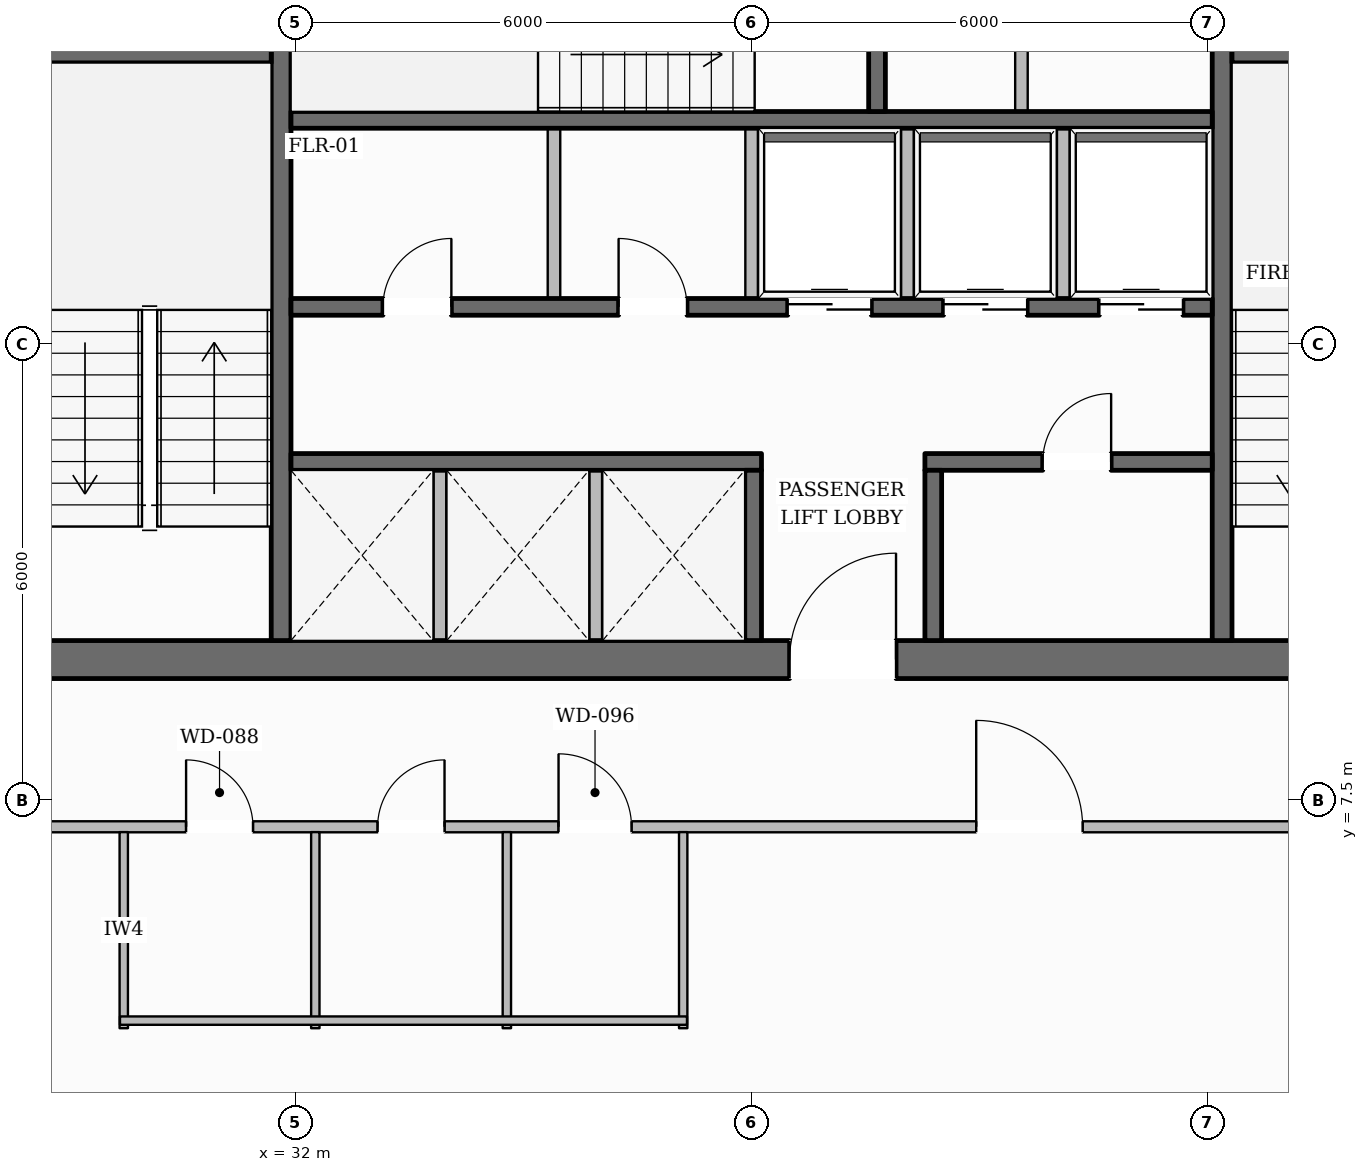
"""IFC4 building model, lengths in metres.
Left out: names, types, materials, properties, quantities, classifications, styles, units other than length and angle.
Written with IfcOpenShell. Run it as: python <this file> out.ifc"""

import sys

from ifc_helpers import new_model, si_unit, direction, frame, frame_2d, origin, place, context, subcontext, project, spatial, rectangle, extrude, element, fill, save


model = new_model("IFC4")
c1 = context("Model", 3, precision=1e-05, world=origin(), true_north=direction((0.0, 1.0)))
c2 = subcontext(c1, "Body", "Model", "MODEL_VIEW")
j1 = project(units=[si_unit("LENGTHUNIT", "METRE"), si_unit("PLANEANGLEUNIT", "RADIAN")], contexts=[c1])
p1 = place(None, origin())
s1 = spatial("IfcSite", under=j1, at=p1, CompositionType="ELEMENT")
p2 = place(p1, origin())
s2 = spatial("IfcBuilding", under=s1, at=p2, CompositionType="ELEMENT")
p3 = place(p2, frame((0.0, 0.0, 139.4)))
s3 = spatial("IfcBuildingStorey", under=s2, at=p3, CompositionType="ELEMENT", Elevation=139.4)
p4 = place(p3, frame((27.98, 9.35, 0.0), z_axis=(0.0, 0.0, 1.0), x_axis=(1.0, 0.0, 0.0)))
e1 = element("IfcWall", 1, at=p4, inside=s3, PredefinedType="SOLIDWALL", context=c2, shape_type="SweptSolid", body=[
    extrude(rectangle(XDim=20.04, YDim=0.5, at=frame_2d((10.02, 0.0))), origin(), (0.0, 0.0, 1.0), 3.6),
])
p5 = place(p4, frame((10.52, 0.0, 0.0)))
e2 = element("IfcOpeningElement", 2, at=p5, cuts=e1, PredefinedType="OPENING", context=c2, shape_type="SweptSolid", body=[
    extrude(rectangle(XDim=1.4, YDim=2.2, at=frame_2d((0.7, 1.1))), frame((0.0, 0.26, 0.0), z_axis=(0.0, -1.0, 0.0), x_axis=(1.0, 0.0, 0.0)), (0.0, 0.0, 1.0), 0.52),
])
p6 = place(p3, frame((31.81, 9.6, 0.0), z_axis=(0.0, 0.0, 1.0), x_axis=(0.0, 1.0, 0.0)))
e3 = element("IfcWall", 3, at=p6, inside=s3, PredefinedType="SHEAR", context=c2, shape_type="SweptSolid", body=[
    extrude(rectangle(XDim=13.0, YDim=0.26, at=frame_2d((6.5, 0.0))), origin(), (0.0, 0.0, 1.0), 3.6),
])
p7 = place(p6, frame((10.925, 0.0, 0.0)))
e4 = element("IfcOpeningElement", 4, at=p7, cuts=e3, PredefinedType="OPENING", context=c2, shape_type="SweptSolid", body=[
    extrude(rectangle(XDim=1.25, YDim=2.25, at=frame_2d((0.625, 1.125))), frame((0.0, 0.14, 0.0), z_axis=(0.0, -1.0, 0.0), x_axis=(1.0, 0.0, 0.0)), (0.0, 0.0, 1.0), 0.28),
])
p8 = place(p3, frame((44.19, 9.6, 0.0), z_axis=(0.0, 0.0, 1.0), x_axis=(0.0, 1.0, 0.0)))
e5 = element("IfcWall", 5, at=p8, inside=s3, PredefinedType="SHEAR", context=c2, shape_type="SweptSolid", body=[
    extrude(rectangle(XDim=13.0, YDim=0.26, at=frame_2d((6.5, 0.0))), origin(), (0.0, 0.0, 1.0), 3.6),
])
p9 = place(p8, frame((10.925, 0.0, 0.0)))
e6 = element("IfcOpeningElement", 6, at=p9, cuts=e5, PredefinedType="OPENING", context=c2, shape_type="SweptSolid", body=[
    extrude(rectangle(XDim=1.25, YDim=2.25, at=frame_2d((0.625, 1.125))), frame((0.0, 0.14, 0.0), z_axis=(0.0, -1.0, 0.0), x_axis=(1.0, 0.0, 0.0)), (0.0, 0.0, 1.0), 0.28),
])
for number, where, z_axis, x_axis in (
    (7, (28.48, 17.33, 0.0), (0.0, 0.0, 1.0), (1.0, 0.0, 0.0)),
    (8, (44.32, 17.33, 0.0), (0.0, 0.0, 1.0), (1.0, 0.0, 0.0)),
):
    element("IfcWall", number, at=place(p3, frame(where, z_axis=z_axis, x_axis=x_axis)), inside=s3, PredefinedType="SHEAR", context=c2, shape_type="SweptSolid", body=[
        extrude(rectangle(XDim=3.2, YDim=0.26, at=frame_2d((1.6, 0.0))), origin(), (0.0, 0.0, 1.0), 3.6),
    ])
p10 = place(p3, frame((31.94, 16.45, 0.0), z_axis=(0.0, 0.0, 1.0), x_axis=(1.0, 0.0, 0.0)))
e9 = element("IfcWall", 9, at=p10, inside=s3, PredefinedType="SOLIDWALL", context=c2, shape_type="SweptSolid", body=[
    extrude(rectangle(XDim=12.12, YDim=0.22, at=frame_2d((6.06, 0.0))), origin(), (0.0, 0.0, 1.0), 3.6),
])
p11 = place(p3, frame((39.65, 16.56, 0.0), z_axis=(0.0, 0.0, 1.0), x_axis=(0.0, 1.0, 0.0)))
e10 = element("IfcWall", 10, at=p11, inside=s3, PredefinedType="SOLIDWALL", context=c2, shape_type="SweptSolid", body=[
    extrude(rectangle(XDim=3.2, YDim=0.22, at=frame_2d((1.6, 0.0))), origin(), (0.0, 0.0, 1.0), 3.6),
])
p12 = place(p3, frame((31.94, 13.99, 0.0), z_axis=(0.0, 0.0, 1.0), x_axis=(1.0, 0.0, 0.0)))
e11 = element("IfcWall", 11, at=p12, inside=s3, PredefinedType="SOLIDWALL", context=c2, shape_type="SweptSolid", body=[
    extrude(rectangle(XDim=12.12, YDim=0.22, at=frame_2d((6.06, 0.0))), origin(), (0.0, 0.0, 1.0), 3.6),
])
p13 = place(p12, frame((1.21, 0.0, 0.0)))
e12 = element("IfcOpeningElement", 12, at=p13, cuts=e11, PredefinedType="OPENING", context=c2, shape_type="SweptSolid", body=[
    extrude(rectangle(XDim=0.9, YDim=2.1, at=frame_2d((0.45, 1.05))), frame((0.0, 0.12, 0.0), z_axis=(0.0, -1.0, 0.0), x_axis=(1.0, 0.0, 0.0)), (0.0, 0.0, 1.0), 0.24),
])
p14 = place(p12, frame((4.31, 0.0, 0.0)))
e13 = element("IfcOpeningElement", 13, at=p14, cuts=e11, PredefinedType="OPENING", context=c2, shape_type="SweptSolid", body=[
    extrude(rectangle(XDim=0.9, YDim=2.1, at=frame_2d((0.45, 1.05))), frame((0.0, 0.12, 0.0), z_axis=(0.0, -1.0, 0.0), x_axis=(1.0, 0.0, 0.0)), (0.0, 0.0, 1.0), 0.24),
])
p15 = place(p12, frame((6.535, 0.0, 0.0)))
e14 = element("IfcOpeningElement", 14, at=p15, cuts=e11, PredefinedType="OPENING", context=c2, shape_type="SweptSolid", body=[
    extrude(rectangle(XDim=1.1, YDim=2.2, at=frame_2d((0.55, 1.1))), frame((0.0, 0.12, 0.0), z_axis=(0.0, -1.0, 0.0), x_axis=(1.0, 0.0, 0.0)), (0.0, 0.0, 1.0), 0.24),
])
p16 = place(p12, frame((8.585, 0.0, 0.0)))
e15 = element("IfcOpeningElement", 15, at=p16, cuts=e11, PredefinedType="OPENING", context=c2, shape_type="SweptSolid", body=[
    extrude(rectangle(XDim=1.1, YDim=2.2, at=frame_2d((0.55, 1.1))), frame((0.0, 0.12, 0.0), z_axis=(0.0, -1.0, 0.0), x_axis=(1.0, 0.0, 0.0)), (0.0, 0.0, 1.0), 0.24),
])
p17 = place(p12, frame((10.635, 0.0, 0.0)))
e16 = element("IfcOpeningElement", 16, at=p17, cuts=e11, PredefinedType="OPENING", context=c2, shape_type="SweptSolid", body=[
    extrude(rectangle(XDim=1.1, YDim=2.2, at=frame_2d((0.55, 1.1))), frame((0.0, 0.12, 0.0), z_axis=(0.0, -1.0, 0.0), x_axis=(1.0, 0.0, 0.0)), (0.0, 0.0, 1.0), 0.24),
])
p18 = place(p3, frame((31.94, 11.95, 0.0), z_axis=(0.0, 0.0, 1.0), x_axis=(1.0, 0.0, 0.0)))
e17 = element("IfcWall", 17, at=p18, inside=s3, PredefinedType="SOLIDWALL", context=c2, shape_type="SweptSolid", body=[
    extrude(rectangle(XDim=6.19, YDim=0.22, at=frame_2d((3.095, 0.0))), origin(), (0.0, 0.0, 1.0), 3.6),
])
p19 = place(p3, frame((40.28, 11.95, 0.0), z_axis=(0.0, 0.0, 1.0), x_axis=(1.0, 0.0, 0.0)))
e18 = element("IfcWall", 18, at=p19, inside=s3, PredefinedType="SOLIDWALL", context=c2, shape_type="SweptSolid", body=[
    extrude(rectangle(XDim=3.78, YDim=0.22, at=frame_2d((1.89, 0.0))), origin(), (0.0, 0.0, 1.0), 3.6),
])
p20 = place(p19, frame((1.55, 0.0, 0.0)))
e19 = element("IfcOpeningElement", 19, at=p20, cuts=e18, PredefinedType="OPENING", context=c2, shape_type="SweptSolid", body=[
    extrude(rectangle(XDim=0.9, YDim=2.1, at=frame_2d((0.45, 1.05))), frame((0.0, 0.12, 0.0), z_axis=(0.0, -1.0, 0.0), x_axis=(1.0, 0.0, 0.0)), (0.0, 0.0, 1.0), 0.24),
])
for number, where, z_axis, x_axis in (
    (20, (38.02, 9.6, 0.0), (0.0, 0.0, 1.0), (0.0, 1.0, 0.0)),
    (21, (40.39, 9.6, 0.0), (0.0, 0.0, 1.0), (0.0, 1.0, 0.0)),
):
    element("IfcWall", number, at=place(p3, frame(where, z_axis=z_axis, x_axis=x_axis)), inside=s3, PredefinedType="SOLIDWALL", context=c2, shape_type="SweptSolid", body=[
        extrude(rectangle(XDim=2.24, YDim=0.22, at=frame_2d((1.12, 0.0))), origin(), (0.0, 0.0, 1.0), 3.6),
    ])
p21 = place(p3, frame((13.257, 11.982, 0.0), z_axis=(0.0, 0.0, 1.0), x_axis=(0.506593608381, 0.862184966204, 0.0)))
e22 = element("IfcWall", 22, at=p21, inside=s3, PredefinedType="STANDARD", context=c2, shape_type="SweptSolid", body=[
    extrude(rectangle(XDim=37.828, YDim=0.38, at=frame_2d((18.914, 0.0))), origin(), (0.0, 0.0, 1.0), 3.059),
])
p22 = place(p21, frame((33.507, 0.0, 0.65)))
e23 = element("IfcOpeningElement", 23, at=p22, cuts=e22, PredefinedType="OPENING", context=c2, shape_type="SweptSolid", body=[
    extrude(rectangle(XDim=1.55, YDim=1.75, at=frame_2d((0.775, 0.875))), frame((0.0, 0.2, 0.0), z_axis=(0.0, -1.0, 0.0), x_axis=(1.0, 0.0, 0.0)), (0.0, 0.0, 1.0), 0.4),
])
p23 = place(p21, frame((27.362, 0.0, 0.65)))
e24 = element("IfcOpeningElement", 24, at=p23, cuts=e22, PredefinedType="OPENING", context=c2, shape_type="SweptSolid", body=[
    extrude(rectangle(XDim=1.55, YDim=1.75, at=frame_2d((0.775, 0.875))), frame((0.0, 0.2, 0.0), z_axis=(0.0, -1.0, 0.0), x_axis=(1.0, 0.0, 0.0)), (0.0, 0.0, 1.0), 0.4),
])
p24 = place(p21, frame((15.07, 0.0, 0.65)))
e25 = element("IfcOpeningElement", 25, at=p24, cuts=e22, PredefinedType="OPENING", context=c2, shape_type="SweptSolid", body=[
    extrude(rectangle(XDim=1.55, YDim=1.75, at=frame_2d((0.775, 0.875))), frame((0.0, 0.2, 0.0), z_axis=(0.0, -1.0, 0.0), x_axis=(1.0, 0.0, 0.0)), (0.0, 0.0, 1.0), 0.4),
])
p25 = place(p21, frame((8.924, 0.0, 0.65)))
e26 = element("IfcOpeningElement", 26, at=p25, cuts=e22, PredefinedType="OPENING", context=c2, shape_type="SweptSolid", body=[
    extrude(rectangle(XDim=1.55, YDim=1.75, at=frame_2d((0.775, 0.875))), frame((0.0, 0.2, 0.0), z_axis=(0.0, -1.0, 0.0), x_axis=(1.0, 0.0, 0.0)), (0.0, 0.0, 1.0), 0.4),
])
p26 = place(p21, frame((2.778, 0.0, 0.65)))
e27 = element("IfcOpeningElement", 27, at=p26, cuts=e22, PredefinedType="OPENING", context=c2, shape_type="SweptSolid", body=[
    extrude(rectangle(XDim=1.55, YDim=1.75, at=frame_2d((0.775, 0.875))), frame((0.0, 0.2, 0.0), z_axis=(0.0, -1.0, 0.0), x_axis=(1.0, 0.0, 0.0)), (0.0, 0.0, 1.0), 0.4),
])
p27 = place(p3, frame((43.468, 44.663, 0.0), z_axis=(0.0, 0.0, 1.0), x_axis=(0.501788207044, -0.864990517446, 0.0)))
e28 = element("IfcWall", 28, at=p27, inside=s3, PredefinedType="STANDARD", context=c2, shape_type="SweptSolid", body=[
    extrude(rectangle(XDim=37.465, YDim=0.38, at=frame_2d((18.732, 0.0))), origin(), (0.0, 0.0, 1.0), 3.059),
])
p28 = place(p27, frame((33.167, 0.0, 0.65)))
e29 = element("IfcOpeningElement", 29, at=p28, cuts=e28, PredefinedType="OPENING", context=c2, shape_type="SweptSolid", body=[
    extrude(rectangle(XDim=1.55, YDim=1.75, at=frame_2d((0.775, 0.875))), frame((0.0, 0.2, 0.0), z_axis=(0.0, -1.0, 0.0), x_axis=(1.0, 0.0, 0.0)), (0.0, 0.0, 1.0), 0.4),
])
p29 = place(p27, frame((27.083, 0.0, 0.65)))
e30 = element("IfcOpeningElement", 30, at=p29, cuts=e28, PredefinedType="OPENING", context=c2, shape_type="SweptSolid", body=[
    extrude(rectangle(XDim=1.55, YDim=1.75, at=frame_2d((0.775, 0.875))), frame((0.0, 0.2, 0.0), z_axis=(0.0, -1.0, 0.0), x_axis=(1.0, 0.0, 0.0)), (0.0, 0.0, 1.0), 0.4),
])
p30 = place(p27, frame((14.914, 0.0, 0.65)))
e31 = element("IfcOpeningElement", 31, at=p30, cuts=e28, PredefinedType="OPENING", context=c2, shape_type="SweptSolid", body=[
    extrude(rectangle(XDim=1.55, YDim=1.75, at=frame_2d((0.775, 0.875))), frame((0.0, 0.2, 0.0), z_axis=(0.0, -1.0, 0.0), x_axis=(1.0, 0.0, 0.0)), (0.0, 0.0, 1.0), 0.4),
])
p31 = place(p27, frame((8.83, 0.0, 0.65)))
e32 = element("IfcOpeningElement", 32, at=p31, cuts=e28, PredefinedType="OPENING", context=c2, shape_type="SweptSolid", body=[
    extrude(rectangle(XDim=1.55, YDim=1.75, at=frame_2d((0.775, 0.875))), frame((0.0, 0.2, 0.0), z_axis=(0.0, -1.0, 0.0), x_axis=(1.0, 0.0, 0.0)), (0.0, 0.0, 1.0), 0.4),
])
p32 = place(p27, frame((2.745, 0.0, 0.65)))
e33 = element("IfcOpeningElement", 33, at=p32, cuts=e28, PredefinedType="OPENING", context=c2, shape_type="SweptSolid", body=[
    extrude(rectangle(XDim=1.55, YDim=1.75, at=frame_2d((0.775, 0.875))), frame((0.0, 0.2, 0.0), z_axis=(0.0, -1.0, 0.0), x_axis=(1.0, 0.0, 0.0)), (0.0, 0.0, 1.0), 0.4),
])
for number, where, z_axis, x_axis in (
    (34, (33.9, 9.55, 0.0), (0.0, 0.0, 1.0), (0.0, 1.0, 0.0)),
    (35, (35.95, 9.55, 0.0), (0.0, 0.0, 1.0), (0.0, 1.0, 0.0)),
):
    element("IfcWall", number, at=place(p3, frame(where, z_axis=z_axis, x_axis=x_axis)), inside=s3, PredefinedType="PARTITIONING", context=c2, shape_type="SweptSolid", body=[
        extrude(rectangle(XDim=2.29, YDim=0.165, at=frame_2d((1.145, 0.0))), origin(), (0.0, 0.0, 1.0), 3.6),
    ])
for number, where, z_axis, x_axis in (
    (36, (38.0, 14.1, 0.0), (0.0, 0.0, 1.0), (0.0, 1.0, 0.0)),
    (37, (35.4, 14.1, 0.0), (0.0, 0.0, 1.0), (0.0, 1.0, 0.0)),
    (38, (40.05, 14.1, 0.0), (0.0, 0.0, 1.0), (0.0, 1.0, 0.0)),
    (39, (42.1, 14.1, 0.0), (0.0, 0.0, 1.0), (0.0, 1.0, 0.0)),
):
    element("IfcWall", number, at=place(p3, frame(where, z_axis=z_axis, x_axis=x_axis)), inside=s3, PredefinedType="PARTITIONING", context=c2, shape_type="SweptSolid", body=[
        extrude(rectangle(XDim=2.24, YDim=0.165, at=frame_2d((1.12, 0.0))), origin(), (0.0, 0.0, 1.0), 3.6),
    ])
p33 = place(p3, frame((41.55, 16.56, 0.0), z_axis=(0.0, 0.0, 1.0), x_axis=(0.0, 1.0, 0.0)))
e40 = element("IfcWall", 40, at=p33, inside=s3, PredefinedType="PARTITIONING", context=c2, shape_type="SweptSolid", body=[
    extrude(rectangle(XDim=3.2, YDim=0.165, at=frame_2d((1.6, 0.0))), origin(), (0.0, 0.0, 1.0), 3.6),
])
p34 = place(p3, frame((26.03, 7.15, 0.0), z_axis=(0.0, 0.0, 1.0), x_axis=(1.0, 0.0, 0.0)))
e41 = element("IfcWall", 41, at=p34, inside=s3, PredefinedType="PARTITIONING", context=c2, shape_type="SweptSolid", body=[
    extrude(rectangle(XDim=23.94, YDim=0.145, at=frame_2d((11.97, 0.0))), origin(), (0.0, 0.0, 1.0), 3.6),
])
p35 = place(p34, frame((4.53, 0.0, 0.0)))
e42 = element("IfcOpeningElement", 42, at=p35, cuts=e41, PredefinedType="OPENING", context=c2, shape_type="SweptSolid", body=[
    extrude(rectangle(XDim=0.88, YDim=2.1, at=frame_2d((0.44, 1.05))), frame((0.0, 0.083, 0.0), z_axis=(0.0, -1.0, 0.0), x_axis=(1.0, 0.0, 0.0)), (0.0, 0.0, 1.0), 0.165),
])
p36 = place(p34, frame((7.05, 0.0, 0.0)))
e43 = element("IfcOpeningElement", 43, at=p36, cuts=e41, PredefinedType="OPENING", context=c2, shape_type="SweptSolid", body=[
    extrude(rectangle(XDim=0.88, YDim=2.1, at=frame_2d((0.44, 1.05))), frame((0.0, 0.083, 0.0), z_axis=(0.0, -1.0, 0.0), x_axis=(1.0, 0.0, 0.0)), (0.0, 0.0, 1.0), 0.165),
])
p37 = place(p34, frame((9.43, 0.0, 0.0)))
e44 = element("IfcOpeningElement", 44, at=p37, cuts=e41, PredefinedType="OPENING", context=c2, shape_type="SweptSolid", body=[
    extrude(rectangle(XDim=0.96, YDim=2.1, at=frame_2d((0.48, 1.05))), frame((0.0, 0.083, 0.0), z_axis=(0.0, -1.0, 0.0), x_axis=(1.0, 0.0, 0.0)), (0.0, 0.0, 1.0), 0.165),
])
p38 = place(p34, frame((14.925, 0.0, 0.0)))
e45 = element("IfcOpeningElement", 45, at=p38, cuts=e41, PredefinedType="OPENING", context=c2, shape_type="SweptSolid", body=[
    extrude(rectangle(XDim=1.4, YDim=2.2, at=frame_2d((0.7, 1.1))), frame((0.0, 0.083, 0.0), z_axis=(0.0, -1.0, 0.0), x_axis=(1.0, 0.0, 0.0)), (0.0, 0.0, 1.0), 0.165),
])
for number, where, z_axis, x_axis in (
    (46, (29.74, 4.5, 0.0), (0.0, 0.0, 1.0), (0.0, 1.0, 0.0)),
    (47, (32.26, 4.5, 0.0), (0.0, 0.0, 1.0), (0.0, 1.0, 0.0)),
    (48, (34.78, 4.5, 0.0), (0.0, 0.0, 1.0), (0.0, 1.0, 0.0)),
    (49, (37.1, 4.5, 0.0), (0.0, 0.0, 1.0), (0.0, 1.0, 0.0)),
):
    element("IfcWall", number, at=place(p3, frame(where, z_axis=z_axis, x_axis=x_axis)), inside=s3, PredefinedType="PLUMBINGWALL", context=c2, shape_type="SweptSolid", body=[
        extrude(rectangle(XDim=2.58, YDim=0.11, at=frame_2d((1.29, 0.0))), origin(), (0.0, 0.0, 1.0), 3.6),
    ])
p39 = place(p3, frame((29.69, 4.6, 0.0), z_axis=(0.0, 0.0, 1.0), x_axis=(1.0, 0.0, 0.0)))
e50 = element("IfcWall", 50, at=p39, inside=s3, PredefinedType="PLUMBINGWALL", context=c2, shape_type="SweptSolid", body=[
    extrude(rectangle(XDim=7.46, YDim=0.11, at=frame_2d((3.73, 0.0))), origin(), (0.0, 0.0, 1.0), 3.6),
])
p40 = place(p5, origin())
e51 = element("IfcDoor", 51, at=p40, inside=s3, OperationType="SINGLE_SWING_RIGHT", PredefinedType="DOOR", context=c2, shape_type="SweptSolid", body=[
    extrude(rectangle(XDim=1.4, YDim=2.2, at=frame_2d((0.7, 1.1))), frame((0.0, 0.025, 0.0), z_axis=(0.0, -1.0, 0.0), x_axis=(1.0, 0.0, 0.0)), (0.0, 0.0, 1.0), 0.05),
])
fill(e2, e51)
p41 = place(p13, origin())
e52 = element("IfcDoor", 52, at=p41, inside=s3, OperationType="SINGLE_SWING_RIGHT", PredefinedType="DOOR", context=c2, shape_type="SweptSolid", body=[
    extrude(rectangle(XDim=0.9, YDim=2.1, at=frame_2d((0.45, 1.05))), frame((0.0, 0.025, 0.0), z_axis=(0.0, -1.0, 0.0), x_axis=(1.0, 0.0, 0.0)), (0.0, 0.0, 1.0), 0.05),
])
fill(e12, e52)
p42 = place(p14, origin())
e53 = element("IfcDoor", 53, at=p42, inside=s3, OperationType="SINGLE_SWING_LEFT", PredefinedType="DOOR", context=c2, shape_type="SweptSolid", body=[
    extrude(rectangle(XDim=0.9, YDim=2.1, at=frame_2d((0.45, 1.05))), frame((0.0, 0.025, 0.0), z_axis=(0.0, -1.0, 0.0), x_axis=(1.0, 0.0, 0.0)), (0.0, 0.0, 1.0), 0.05),
])
fill(e13, e53)
p43 = place(p15, origin())
e54 = element("IfcDoor", 54, at=p43, inside=s3, OperationType="DOUBLE_DOOR_SLIDING", PredefinedType="DOOR", context=c2, shape_type="SweptSolid", body=[
    extrude(rectangle(XDim=1.1, YDim=2.2, at=frame_2d((0.55, 1.1))), frame((0.0, 0.025, 0.0), z_axis=(0.0, -1.0, 0.0), x_axis=(1.0, 0.0, 0.0)), (0.0, 0.0, 1.0), 0.05),
])
fill(e14, e54)
p44 = place(p16, origin())
e55 = element("IfcDoor", 55, at=p44, inside=s3, OperationType="DOUBLE_DOOR_SLIDING", PredefinedType="DOOR", context=c2, shape_type="SweptSolid", body=[
    extrude(rectangle(XDim=1.1, YDim=2.2, at=frame_2d((0.55, 1.1))), frame((0.0, 0.025, 0.0), z_axis=(0.0, -1.0, 0.0), x_axis=(1.0, 0.0, 0.0)), (0.0, 0.0, 1.0), 0.05),
])
fill(e15, e55)
p45 = place(p17, origin())
e56 = element("IfcDoor", 56, at=p45, inside=s3, OperationType="DOUBLE_DOOR_SLIDING", PredefinedType="DOOR", context=c2, shape_type="SweptSolid", body=[
    extrude(rectangle(XDim=1.1, YDim=2.2, at=frame_2d((0.55, 1.1))), frame((0.0, 0.025, 0.0), z_axis=(0.0, -1.0, 0.0), x_axis=(1.0, 0.0, 0.0)), (0.0, 0.0, 1.0), 0.05),
])
fill(e16, e56)
p46 = place(p20, origin())
e57 = element("IfcDoor", 57, at=p46, inside=s3, OperationType="SINGLE_SWING_RIGHT", PredefinedType="DOOR", context=c2, shape_type="SweptSolid", body=[
    extrude(rectangle(XDim=0.9, YDim=2.1, at=frame_2d((0.45, 1.05))), frame((0.0, 0.025, 0.0), z_axis=(0.0, -1.0, 0.0), x_axis=(1.0, 0.0, 0.0)), (0.0, 0.0, 1.0), 0.05),
])
fill(e19, e57)
p47 = place(p35, origin())
e58 = element("IfcDoor", 58, at=p47, inside=s3, OperationType="SINGLE_SWING_LEFT", PredefinedType="DOOR", context=c2, shape_type="SweptSolid", body=[
    extrude(rectangle(XDim=0.88, YDim=2.1, at=frame_2d((0.44, 1.05))), frame((0.0, 0.025, 0.0), z_axis=(0.0, -1.0, 0.0), x_axis=(1.0, 0.0, 0.0)), (0.0, 0.0, 1.0), 0.05),
])
fill(e42, e58)
p48 = place(p36, origin())
e59 = element("IfcDoor", 59, at=p48, inside=s3, OperationType="SINGLE_SWING_RIGHT", PredefinedType="DOOR", context=c2, shape_type="SweptSolid", body=[
    extrude(rectangle(XDim=0.88, YDim=2.1, at=frame_2d((0.44, 1.05))), frame((0.0, 0.025, 0.0), z_axis=(0.0, -1.0, 0.0), x_axis=(1.0, 0.0, 0.0)), (0.0, 0.0, 1.0), 0.05),
])
fill(e43, e59)
p49 = place(p37, origin())
e60 = element("IfcDoor", 60, at=p49, inside=s3, OperationType="SINGLE_SWING_LEFT", PredefinedType="DOOR", context=c2, shape_type="SweptSolid", body=[
    extrude(rectangle(XDim=0.96, YDim=2.1, at=frame_2d((0.48, 1.05))), frame((0.0, 0.025, 0.0), z_axis=(0.0, -1.0, 0.0), x_axis=(1.0, 0.0, 0.0)), (0.0, 0.0, 1.0), 0.05),
])
fill(e44, e60)
p50 = place(p38, origin())
e61 = element("IfcDoor", 61, at=p50, inside=s3, OperationType="SINGLE_SWING_LEFT", PredefinedType="DOOR", context=c2, shape_type="SweptSolid", body=[
    extrude(rectangle(XDim=1.4, YDim=2.2, at=frame_2d((0.7, 1.1))), frame((0.0, 0.025, 0.0), z_axis=(0.0, -1.0, 0.0), x_axis=(1.0, 0.0, 0.0)), (0.0, 0.0, 1.0), 0.05),
])
fill(e45, e61)
save(model, sys.argv[1])
